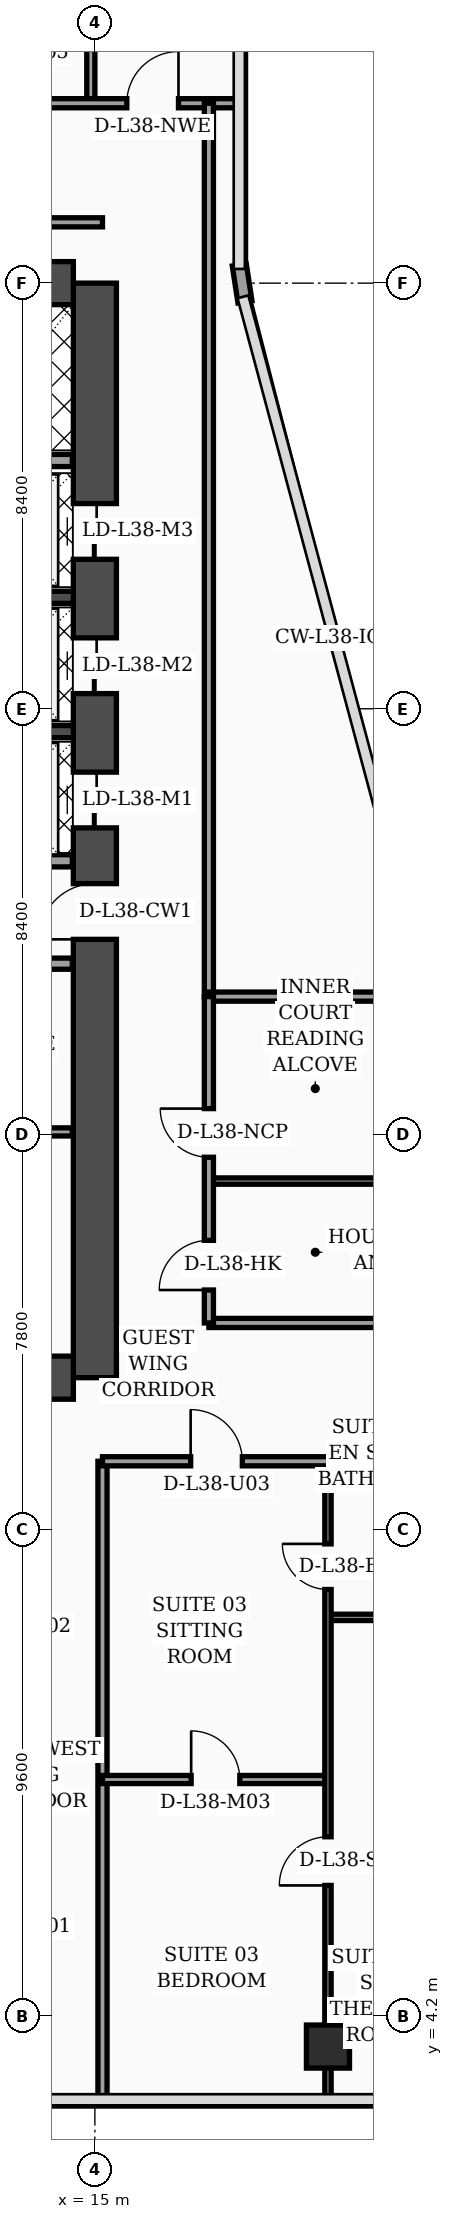
"""IFC4 building model, lengths in metres.
Left out: names, types, materials, properties, quantities, classifications, styles, units other than length and angle.
Written with IfcOpenShell. Run it as: python <this file> out.ifc"""

import sys

from ifc_helpers import new_model, si_unit, direction, frame, frame_2d, origin, origin_2d, place, context, subcontext, project, spatial, rectangle, hollow_rectangle, extrude, element, fill, save


model = new_model("IFC4")
c1 = context("Model", 3, precision=1e-05, world=origin(), true_north=direction((0.0, 1.0)))
c2 = subcontext(c1, "Body", "Model", "MODEL_VIEW")
j1 = project(units=[si_unit("LENGTHUNIT", "METRE"), si_unit("PLANEANGLEUNIT", "RADIAN")], contexts=[c1])
p1 = place(None, origin())
s1 = spatial("IfcSite", under=j1, at=p1, CompositionType="ELEMENT")
p2 = place(p1, origin())
s2 = spatial("IfcBuilding", under=s1, at=p2, CompositionType="ELEMENT")
p3 = place(p2, frame((0.0, 0.0, 156.1)))
s3 = spatial("IfcBuildingStorey", under=s2, at=p3, CompositionType="ELEMENT", Elevation=156.1)
p4 = place(p3, frame((15.0, 16.8, 0.0), z_axis=(0.0, 0.0, 1.0), x_axis=(0.0, 1.0, 0.0)))
e1 = element("IfcWall", 1, at=p4, inside=s3, PredefinedType="SHEAR", context=c2, shape_type="SweptSolid", body=[
    extrude(rectangle(XDim=21.6, YDim=0.85, at=frame_2d((10.8, 0.0))), origin(), (0.0, 0.0, 1.0), 3.56),
])
p5 = place(p4, frame((8.65, 0.0, 0.0)))
e2 = element("IfcOpeningElement", 2, at=p5, cuts=e1, PredefinedType="OPENING", context=c2, shape_type="SweptSolid", body=[
    extrude(rectangle(XDim=1.1, YDim=2.2, at=frame_2d((0.55, 1.1))), frame((0.0, 0.435, 0.0), z_axis=(0.0, -1.0, 0.0), x_axis=(1.0, 0.0, 0.0)), (0.0, 0.0, 1.0), 0.87),
])
p6 = place(p4, frame((10.85, 0.0, 0.0)))
e3 = element("IfcOpeningElement", 3, at=p6, cuts=e1, PredefinedType="OPENING", context=c2, shape_type="SweptSolid", body=[
    extrude(rectangle(XDim=1.1, YDim=2.2, at=frame_2d((0.55, 1.1))), frame((0.0, 0.435, 0.0), z_axis=(0.0, -1.0, 0.0), x_axis=(1.0, 0.0, 0.0)), (0.0, 0.0, 1.0), 0.87),
])
p7 = place(p4, frame((13.5, 0.0, 0.0)))
e4 = element("IfcOpeningElement", 4, at=p7, cuts=e1, PredefinedType="OPENING", context=c2, shape_type="SweptSolid", body=[
    extrude(rectangle(XDim=1.1, YDim=2.2, at=frame_2d((0.55, 1.1))), frame((0.0, 0.435, 0.0), z_axis=(0.0, -1.0, 0.0), x_axis=(1.0, 0.0, 0.0)), (0.0, 0.0, 1.0), 0.87),
])
p8 = place(p4, frame((16.15, 0.0, 0.0)))
e5 = element("IfcOpeningElement", 5, at=p8, cuts=e1, PredefinedType="OPENING", context=c2, shape_type="SweptSolid", body=[
    extrude(rectangle(XDim=1.1, YDim=2.2, at=frame_2d((0.55, 1.1))), frame((0.0, 0.435, 0.0), z_axis=(0.0, -1.0, 0.0), x_axis=(1.0, 0.0, 0.0)), (0.0, 0.0, 1.0), 0.87),
])
for number, where, z_axis, x_axis in (
    (6, (4.625, 38.4, 0.0), (0.0, 0.0, 1.0), (1.0, 0.0, 0.0)),
    (7, (4.625, 16.8, 0.0), (0.0, 0.0, 1.0), (1.0, 0.0, 0.0)),
):
    element("IfcWall", number, at=place(p3, frame(where, z_axis=z_axis, x_axis=x_axis)), inside=s3, PredefinedType="SHEAR", context=c2, shape_type="SweptSolid", body=[
        extrude(rectangle(XDim=9.95, YDim=0.85, at=frame_2d((4.975, 0.0))), origin(), (0.0, 0.0, 1.0), 3.56),
    ])
for number, where, z_axis, x_axis in (
    (8, (12.18, 29.55, 0.0), (0.0, 0.0, 1.0), (1.0, 0.0, 0.0)),
    (9, (12.18, 32.2, 0.0), (0.0, 0.0, 1.0), (1.0, 0.0, 0.0)),
):
    element("IfcWall", number, at=place(p3, frame(where, z_axis=z_axis, x_axis=x_axis)), inside=s3, PredefinedType="SOLIDWALL", context=c2, shape_type="SweptSolid", body=[
        extrude(rectangle(XDim=2.395, YDim=0.24, at=frame_2d((1.198, 0.0))), origin(), (0.0, 0.0, 1.0), 3.56),
    ])
p9 = place(p3, frame((19.6, 3.6, 0.0), z_axis=(0.0, 0.0, 1.0), x_axis=(1.0, 0.0, 0.0)))
e10 = element("IfcColumn", 10, at=p9, inside=s3, PredefinedType="COLUMN", context=c2, shape_type="SweptSolid", body=[
    extrude(hollow_rectangle(XDim=0.85, YDim=0.85, WallThickness=0.036, at=origin_2d()), origin(), (0.0, 0.0, 1.0), 3.56),
])
p10 = place(p3, frame((17.962, 38.03, 0.0), z_axis=(0.0, 0.0, 1.0), x_axis=(-0.15141125477, 0.988470855377, 0.0)))
e11 = element("IfcWall", 11, at=p10, inside=s3, PredefinedType="SOLIDWALL", context=c2, shape_type="SweptSolid", body=[
    extrude(rectangle(XDim=0.739, YDim=0.28, at=frame_2d((0.369, 0.0))), origin(), (0.0, 0.0, 1.0), 3.56),
])
p11 = place(p3, frame((9.68, 21.65, 0.0), z_axis=(0.0, 0.0, 1.0), x_axis=(1.0, 0.0, 0.0)))
e12 = element("IfcWall", 12, at=p11, inside=s3, PredefinedType="PARTITIONING", context=c2, shape_type="SweptSolid", body=[
    extrude(rectangle(XDim=4.875, YDim=0.16, at=frame_2d((2.438, 0.0))), origin(), (0.0, 0.0, 1.0), 3.09),
])
p12 = place(p11, frame((1.1, 0.0, 0.0)))
e13 = element("IfcOpeningElement", 13, at=p12, cuts=e12, PredefinedType="OPENING", context=c2, shape_type="SweptSolid", body=[
    extrude(rectangle(XDim=0.98, YDim=2.15, at=frame_2d((0.49, 1.075))), frame((0.0, 0.09, 0.0), z_axis=(0.0, -1.0, 0.0), x_axis=(1.0, 0.0, 0.0)), (0.0, 0.0, 1.0), 0.18),
])
p13 = place(p3, frame((9.68, 24.97, 0.0), z_axis=(0.0, 0.0, 1.0), x_axis=(1.0, 0.0, 0.0)))
e14 = element("IfcWall", 14, at=p13, inside=s3, PredefinedType="SOLIDWALL", context=c2, shape_type="SweptSolid", body=[
    extrude(rectangle(XDim=4.875, YDim=0.22, at=frame_2d((2.438, 0.0))), origin(), (0.0, 0.0, 1.0), 2.94),
])
p14 = place(p13, frame((0.9, 0.0, 0.0)))
e15 = element("IfcOpeningElement", 15, at=p14, cuts=e14, PredefinedType="OPENING", context=c2, shape_type="SweptSolid", body=[
    extrude(rectangle(XDim=0.98, YDim=2.15, at=frame_2d((0.49, 1.075))), frame((0.0, 0.12, 0.0), z_axis=(0.0, -1.0, 0.0), x_axis=(1.0, 0.0, 0.0)), (0.0, 0.0, 1.0), 0.24),
])
p15 = place(p3, frame((12.25, 27.0, 0.0), z_axis=(0.0, 0.0, 1.0), x_axis=(1.0, 0.0, 0.0)))
e16 = element("IfcWall", 16, at=p15, inside=s3, PredefinedType="SOLIDWALL", context=c2, shape_type="SweptSolid", body=[
    extrude(rectangle(XDim=2.305, YDim=0.24, at=frame_2d((1.152, 0.0))), origin(), (0.0, 0.0, 1.0), 3.56),
])
p16 = place(p3, frame((9.66, 34.9, 0.0), z_axis=(0.0, 0.0, 1.0), x_axis=(1.0, 0.0, 0.0)))
e17 = element("IfcWall", 17, at=p16, inside=s3, PredefinedType="SOLIDWALL", context=c2, shape_type="SweptSolid", body=[
    extrude(rectangle(XDim=4.895, YDim=0.24, at=frame_2d((2.448, 0.0))), origin(), (0.0, 0.0, 1.0), 3.56),
])
p17 = place(p3, frame((15.15, 2.44, 0.0), z_axis=(0.0, 0.0, 1.0), x_axis=(0.0, 1.0, 0.0)))
e18 = element("IfcWall", 18, at=p17, inside=s3, PredefinedType="PARTITIONING", context=c2, shape_type="SweptSolid", body=[
    extrude(rectangle(XDim=12.71, YDim=0.18, at=frame_2d((6.355, 0.0))), origin(), (0.0, 0.0, 1.0), 3.04),
])
p18 = place(p3, frame((19.6, 12.07, 0.0), z_axis=(0.0, 0.0, 1.0), x_axis=(1.0, 0.0, 0.0)))
e19 = element("IfcWall", 19, at=p18, inside=s3, PredefinedType="PARTITIONING", context=c2, shape_type="SweptSolid", body=[
    extrude(rectangle(XDim=2.0, YDim=0.125, at=frame_2d((1.0, 0.0))), origin(), (0.0, 0.0, 1.0), 3.56),
])
p19 = place(p3, frame((15.15, 8.87, 0.0), z_axis=(0.0, 0.0, 1.0), x_axis=(1.0, 0.0, 0.0)))
e20 = element("IfcWall", 20, at=p19, inside=s3, PredefinedType="PARTITIONING", context=c2, shape_type="SweptSolid", body=[
    extrude(rectangle(XDim=4.45, YDim=0.16, at=frame_2d((2.225, 0.0))), origin(), (0.0, 0.0, 1.0), 3.56),
])
p20 = place(p19, frame((1.75, 0.0, 0.0)))
e21 = element("IfcOpeningElement", 21, at=p20, cuts=e20, PredefinedType="OPENING", context=c2, shape_type="SweptSolid", body=[
    extrude(rectangle(XDim=0.96, YDim=2.2, at=frame_2d((0.48, 1.1))), frame((0.0, 0.09, 0.0), z_axis=(0.0, -1.0, 0.0), x_axis=(1.0, 0.0, 0.0)), (0.0, 0.0, 1.0), 0.18),
])
p21 = place(p3, frame((19.6, 2.44, 0.0), z_axis=(0.0, 0.0, 1.0), x_axis=(0.0, 1.0, 0.0)))
e22 = element("IfcWall", 22, at=p21, inside=s3, PredefinedType="PARTITIONING", context=c2, shape_type="SweptSolid", body=[
    extrude(rectangle(XDim=12.71, YDim=0.125, at=frame_2d((6.355, 0.0))), origin(), (0.0, 0.0, 1.0), 2.49),
])
p22 = place(p21, frame((4.34, 0.0, 0.0)))
e23 = element("IfcOpeningElement", 23, at=p22, cuts=e22, PredefinedType="OPENING", context=c2, shape_type="SweptSolid", body=[
    extrude(rectangle(XDim=0.96, YDim=2.2, at=frame_2d((0.48, 1.1))), frame((0.0, 0.073, 0.0), z_axis=(0.0, -1.0, 0.0), x_axis=(1.0, 0.0, 0.0)), (0.0, 0.0, 1.0), 0.145),
])
p23 = place(p21, frame((10.18, 0.0, 0.0)))
e24 = element("IfcOpeningElement", 24, at=p23, cuts=e22, PredefinedType="OPENING", context=c2, shape_type="SweptSolid", body=[
    extrude(rectangle(XDim=0.9, YDim=2.15, at=frame_2d((0.45, 1.075))), frame((0.0, 0.073, 0.0), z_axis=(0.0, -1.0, 0.0), x_axis=(1.0, 0.0, 0.0)), (0.0, 0.0, 1.0), 0.145),
])
p24 = place(p3, frame((15.15, 15.15, 0.0), z_axis=(0.0, 0.0, 1.0), x_axis=(1.0, 0.0, 0.0)))
e25 = element("IfcWall", 25, at=p24, inside=s3, PredefinedType="PARTITIONING", context=c2, shape_type="SweptSolid", body=[
    extrude(rectangle(XDim=6.45, YDim=0.18, at=frame_2d((3.225, 0.0))), origin(), (0.0, 0.0, 1.0), 2.49),
])
p25 = place(p24, frame((1.74, 0.0, 0.0)))
e26 = element("IfcOpeningElement", 26, at=p25, cuts=e25, PredefinedType="OPENING", context=c2, shape_type="SweptSolid", body=[
    extrude(rectangle(XDim=1.02, YDim=2.2, at=frame_2d((0.51, 1.1))), frame((0.0, 0.1, 0.0), z_axis=(0.0, -1.0, 0.0), x_axis=(1.0, 0.0, 0.0)), (0.0, 0.0, 1.0), 0.2),
])
p26 = place(p3, frame((14.92, 41.95, 0.0), z_axis=(0.0, 0.0, 1.0), x_axis=(0.0, 1.0, 0.0)))
e27 = element("IfcWall", 27, at=p26, inside=s3, PredefinedType="PARTITIONING", context=c2, shape_type="SweptSolid", body=[
    extrude(rectangle(XDim=5.85, YDim=0.16, at=frame_2d((2.925, 0.0))), origin(), (0.0, 0.0, 1.0), 3.04),
])
p27 = place(p3, frame((0.08, 41.95, 0.0), z_axis=(0.0, 0.0, 1.0), x_axis=(1.0, 0.0, 0.0)))
e28 = element("IfcWall", 28, at=p27, inside=s3, PredefinedType="PARTITIONING", context=c2, shape_type="SweptSolid", body=[
    extrude(rectangle(XDim=17.77, YDim=0.18, at=frame_2d((8.885, 0.0))), origin(), (0.0, 0.0, 1.0), 2.94),
])
p28 = place(p27, frame((0.9, 0.0, 0.0)))
e29 = element("IfcOpeningElement", 29, at=p28, cuts=e28, PredefinedType="OPENING", context=c2, shape_type="SweptSolid", body=[
    extrude(rectangle(XDim=1.02, YDim=2.2, at=frame_2d((0.51, 1.1))), frame((0.0, 0.1, 0.0), z_axis=(0.0, -1.0, 0.0), x_axis=(1.0, 0.0, 0.0)), (0.0, 0.0, 1.0), 0.2),
])
p29 = place(p27, frame((4.45, 0.0, 0.0)))
e30 = element("IfcOpeningElement", 30, at=p29, cuts=e28, PredefinedType="OPENING", context=c2, shape_type="SweptSolid", body=[
    extrude(rectangle(XDim=1.02, YDim=2.2, at=frame_2d((0.51, 1.1))), frame((0.0, 0.1, 0.0), z_axis=(0.0, -1.0, 0.0), x_axis=(1.0, 0.0, 0.0)), (0.0, 0.0, 1.0), 0.2),
])
p30 = place(p27, frame((10.33, 0.0, 0.0)))
e31 = element("IfcOpeningElement", 31, at=p30, cuts=e28, PredefinedType="OPENING", context=c2, shape_type="SweptSolid", body=[
    extrude(rectangle(XDim=1.02, YDim=2.2, at=frame_2d((0.51, 1.1))), frame((0.0, 0.1, 0.0), z_axis=(0.0, -1.0, 0.0), x_axis=(1.0, 0.0, 0.0)), (0.0, 0.0, 1.0), 0.2),
])
p31 = place(p27, frame((15.55, 0.0, 0.0)))
e32 = element("IfcOpeningElement", 32, at=p31, cuts=e28, PredefinedType="OPENING", context=c2, shape_type="SweptSolid", body=[
    extrude(rectangle(XDim=1.02, YDim=2.2, at=frame_2d((0.51, 1.1))), frame((0.0, 0.1, 0.0), z_axis=(0.0, -1.0, 0.0), x_axis=(1.0, 0.0, 0.0)), (0.0, 0.0, 1.0), 0.2),
])
p32 = place(p3, frame((17.25, 24.3, 0.0), z_axis=(0.0, 0.0, 1.0), x_axis=(0.0, 1.0, 0.0)))
e33 = element("IfcWall", 33, at=p32, inside=s3, PredefinedType="PARTITIONING", context=c2, shape_type="SweptSolid", body=[
    extrude(rectangle(XDim=17.65, YDim=0.18, at=frame_2d((8.825, 0.0))), origin(), (0.0, 0.0, 1.0), 2.94),
])
p33 = place(p3, frame((3.755, 39.6, 0.0), z_axis=(0.0, 0.0, 1.0), x_axis=(1.0, 0.0, 0.0)))
e34 = element("IfcWall", 34, at=p33, inside=s3, PredefinedType="PARTITIONING", context=c2, shape_type="SweptSolid", body=[
    extrude(rectangle(XDim=11.395, YDim=0.18, at=frame_2d((5.698, 0.0))), origin(), (0.0, 0.0, 1.0), 2.94),
])
p34 = place(p3, frame((17.25, 17.88, 0.0), z_axis=(0.0, 0.0, 1.0), x_axis=(1.0, 0.0, 0.0)))
e35 = element("IfcWall", 35, at=p34, inside=s3, PredefinedType="PARTITIONING", context=c2, shape_type="SweptSolid", body=[
    extrude(rectangle(XDim=4.3, YDim=0.18, at=frame_2d((2.15, 0.0))), origin(), (0.0, 0.0, 1.0), 3.56),
])
p35 = place(p3, frame((17.25, 20.68, 0.0), z_axis=(0.0, 0.0, 1.0), x_axis=(1.0, 0.0, 0.0)))
e36 = element("IfcWall", 36, at=p35, inside=s3, PredefinedType="PARTITIONING", context=c2, shape_type="SweptSolid", body=[
    extrude(rectangle(XDim=4.3, YDim=0.125, at=frame_2d((2.15, 0.0))), origin(), (0.0, 0.0, 1.0), 3.56),
])
p36 = place(p3, frame((17.25, 24.32, 0.0), z_axis=(0.0, 0.0, 1.0), x_axis=(1.0, 0.0, 0.0)))
e37 = element("IfcWall", 37, at=p36, inside=s3, PredefinedType="PARTITIONING", context=c2, shape_type="SweptSolid", body=[
    extrude(rectangle(XDim=4.35, YDim=0.18, at=frame_2d((2.175, 0.0))), origin(), (0.0, 0.0, 1.0), 3.56),
])
p37 = place(p3, frame((17.25, 17.88, 0.0), z_axis=(0.0, 0.0, 1.0), x_axis=(0.0, 1.0, 0.0)))
e38 = element("IfcWall", 38, at=p37, inside=s3, PredefinedType="PARTITIONING", context=c2, shape_type="SweptSolid", body=[
    extrude(rectangle(XDim=6.44, YDim=0.18, at=frame_2d((3.22, 0.0))), origin(), (0.0, 0.0, 1.0), 3.09),
])
p38 = place(p37, frame((0.65, 0.0, 0.0)))
e39 = element("IfcOpeningElement", 39, at=p38, cuts=e38, PredefinedType="OPENING", context=c2, shape_type="SweptSolid", body=[
    extrude(rectangle(XDim=0.98, YDim=2.15, at=frame_2d((0.49, 1.075))), frame((0.0, 0.1, 0.0), z_axis=(0.0, -1.0, 0.0), x_axis=(1.0, 0.0, 0.0)), (0.0, 0.0, 1.0), 0.2),
])
p39 = place(p37, frame((3.27, 0.0, 0.0)))
e40 = element("IfcOpeningElement", 40, at=p39, cuts=e38, PredefinedType="OPENING", context=c2, shape_type="SweptSolid", body=[
    extrude(rectangle(XDim=0.96, YDim=2.2, at=frame_2d((0.48, 1.1))), frame((0.0, 0.1, 0.0), z_axis=(0.0, -1.0, 0.0), x_axis=(1.0, 0.0, 0.0)), (0.0, 0.0, 1.0), 0.2),
])
p40 = place(p20, origin())
e41 = element("IfcDoor", 41, at=p40, inside=s3, OperationType="SINGLE_SWING_LEFT", PredefinedType="DOOR", context=c2, shape_type="SweptSolid", body=[
    extrude(rectangle(XDim=0.96, YDim=2.2, at=frame_2d((0.48, 1.1))), frame((0.0, 0.025, 0.0), z_axis=(0.0, -1.0, 0.0), x_axis=(1.0, 0.0, 0.0)), (0.0, 0.0, 1.0), 0.05),
])
fill(e21, e41)
p41 = place(p22, origin())
e42 = element("IfcDoor", 42, at=p41, inside=s3, OperationType="SINGLE_SWING_LEFT", PredefinedType="DOOR", context=c2, shape_type="SweptSolid", body=[
    extrude(rectangle(XDim=0.96, YDim=2.2, at=frame_2d((0.48, 1.1))), frame((0.0, 0.025, 0.0), z_axis=(0.0, -1.0, 0.0), x_axis=(1.0, 0.0, 0.0)), (0.0, 0.0, 1.0), 0.05),
])
fill(e23, e42)
p42 = place(p23, origin())
e43 = element("IfcDoor", 43, at=p42, inside=s3, OperationType="SINGLE_SWING_RIGHT", PredefinedType="DOOR", context=c2, shape_type="SweptSolid", body=[
    extrude(rectangle(XDim=0.9, YDim=2.15, at=frame_2d((0.45, 1.075))), frame((0.0, 0.025, 0.0), z_axis=(0.0, -1.0, 0.0), x_axis=(1.0, 0.0, 0.0)), (0.0, 0.0, 1.0), 0.05),
])
fill(e24, e43)
p43 = place(p25, origin())
e44 = element("IfcDoor", 44, at=p43, inside=s3, OperationType="SINGLE_SWING_LEFT", PredefinedType="DOOR", context=c2, shape_type="SweptSolid", body=[
    extrude(rectangle(XDim=1.02, YDim=2.2, at=frame_2d((0.51, 1.1))), frame((0.0, 0.025, 0.0), z_axis=(0.0, -1.0, 0.0), x_axis=(1.0, 0.0, 0.0)), (0.0, 0.0, 1.0), 0.05),
])
fill(e26, e44)
p44 = place(p31, origin())
e45 = element("IfcDoor", 45, at=p44, inside=s3, OperationType="SINGLE_SWING_RIGHT", PredefinedType="DOOR", context=c2, shape_type="SweptSolid", body=[
    extrude(rectangle(XDim=1.02, YDim=2.2, at=frame_2d((0.51, 1.1))), frame((0.0, 0.025, 0.0), z_axis=(0.0, -1.0, 0.0), x_axis=(1.0, 0.0, 0.0)), (0.0, 0.0, 1.0), 0.05),
])
fill(e32, e45)
p45 = place(p38, origin())
e46 = element("IfcDoor", 46, at=p45, inside=s3, OperationType="SINGLE_SWING_LEFT", PredefinedType="DOOR", context=c2, shape_type="SweptSolid", body=[
    extrude(rectangle(XDim=0.98, YDim=2.15, at=frame_2d((0.49, 1.075))), frame((0.0, 0.025, 0.0), z_axis=(0.0, -1.0, 0.0), x_axis=(1.0, 0.0, 0.0)), (0.0, 0.0, 1.0), 0.05),
])
fill(e39, e46)
p46 = place(p39, origin())
e47 = element("IfcDoor", 47, at=p46, inside=s3, OperationType="SINGLE_SWING_RIGHT", PredefinedType="DOOR", context=c2, shape_type="SweptSolid", body=[
    extrude(rectangle(XDim=0.96, YDim=2.2, at=frame_2d((0.48, 1.1))), frame((0.0, 0.025, 0.0), z_axis=(0.0, -1.0, 0.0), x_axis=(1.0, 0.0, 0.0)), (0.0, 0.0, 1.0), 0.05),
])
fill(e40, e47)
p47 = place(p5, origin())
e48 = element("IfcDoor", 48, at=p47, inside=s3, OperationType="SINGLE_SWING_LEFT", PredefinedType="DOOR", context=c2, shape_type="SweptSolid", body=[
    extrude(rectangle(XDim=1.1, YDim=2.2, at=frame_2d((0.55, 1.1))), frame((0.0, 0.025, 0.0), z_axis=(0.0, -1.0, 0.0), x_axis=(1.0, 0.0, 0.0)), (0.0, 0.0, 1.0), 0.05),
])
fill(e2, e48)
p48 = place(p6, origin())
e49 = element("IfcDoor", 49, at=p48, inside=s3, OperationType="DOUBLE_DOOR_SLIDING", PredefinedType="DOOR", context=c2, shape_type="SweptSolid", body=[
    extrude(rectangle(XDim=1.1, YDim=2.2, at=frame_2d((0.55, 1.1))), frame((0.0, 0.025, 0.0), z_axis=(0.0, -1.0, 0.0), x_axis=(1.0, 0.0, 0.0)), (0.0, 0.0, 1.0), 0.05),
])
fill(e3, e49)
p49 = place(p7, origin())
e50 = element("IfcDoor", 50, at=p49, inside=s3, OperationType="DOUBLE_DOOR_SLIDING", PredefinedType="DOOR", context=c2, shape_type="SweptSolid", body=[
    extrude(rectangle(XDim=1.1, YDim=2.2, at=frame_2d((0.55, 1.1))), frame((0.0, 0.025, 0.0), z_axis=(0.0, -1.0, 0.0), x_axis=(1.0, 0.0, 0.0)), (0.0, 0.0, 1.0), 0.05),
])
fill(e4, e50)
p50 = place(p8, origin())
e51 = element("IfcDoor", 51, at=p50, inside=s3, OperationType="DOUBLE_DOOR_SLIDING", PredefinedType="DOOR", context=c2, shape_type="SweptSolid", body=[
    extrude(rectangle(XDim=1.1, YDim=2.2, at=frame_2d((0.55, 1.1))), frame((0.0, 0.025, 0.0), z_axis=(0.0, -1.0, 0.0), x_axis=(1.0, 0.0, 0.0)), (0.0, 0.0, 1.0), 0.05),
])
fill(e5, e51)
save(model, sys.argv[1])
